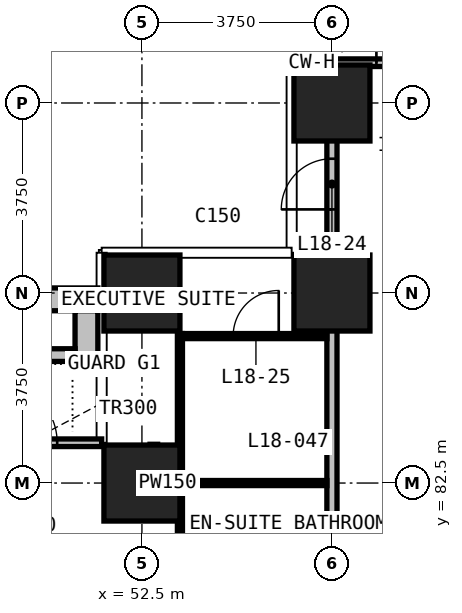
"""IFC4 building model, lengths in metres.
Left out: names, types, materials, properties, quantities, classifications, styles, units other than length and angle.
Written with IfcOpenShell. Run it as: python <this file> out.ifc"""

import sys

from ifc_helpers import new_model, si_unit, direction, frame, frame_2d, origin, origin_2d, place, context, subcontext, project, spatial, rectangle, extrude, element, fill, save


model = new_model("IFC4")
c1 = context("Model", 3, precision=1e-05, world=origin(), true_north=direction((0.0, 1.0)))
c2 = subcontext(c1, "Body", "Model", "MODEL_VIEW")
j1 = project(units=[si_unit("LENGTHUNIT", "METRE"), si_unit("PLANEANGLEUNIT", "RADIAN")], contexts=[c1])
p1 = place(None, origin())
s1 = spatial("IfcSite", under=j1, at=p1, CompositionType="ELEMENT")
p2 = place(p1, origin())
s2 = spatial("IfcBuilding", under=s1, at=p2, CompositionType="ELEMENT")
p3 = place(p2, frame((0.0, 0.0, 79.1)))
s3 = spatial("IfcBuildingStorey", under=s2, at=p3, CompositionType="ELEMENT", Elevation=79.1)
for number, where, z_axis, x_axis in (
    (1, (52.5, 82.5, 0.0), (0.0, 0.0, 1.0), (1.0, 0.0, 0.0)),
    (2, (52.5, 86.25, 0.0), (0.0, 0.0, 1.0), (1.0, 0.0, 0.0)),
    (3, (56.25, 86.25, 0.0), (0.0, 0.0, 1.0), (1.0, 0.0, 0.0)),
    (4, (56.25, 90.0, 0.0), (0.0, 0.0, 1.0), (1.0, 0.0, 0.0)),
):
    element("IfcColumn", number, at=place(p3, frame(where, z_axis=z_axis, x_axis=x_axis)), inside=s3, PredefinedType="COLUMN", context=c2, shape_type="SweptSolid", body=[
        extrude(rectangle(XDim=1.5, YDim=1.5, at=origin_2d()), origin(), (0.0, 0.0, 1.0), 3.3),
    ])
p4 = place(p3, frame((56.25, 90.795, 0.0), z_axis=(0.0, 0.0, 1.0), x_axis=(1.0, 0.0, 0.0)))
e5 = element("IfcWall", 5, at=p4, inside=s3, PredefinedType="SOLIDWALL", context=c2, shape_type="SweptSolid", body=[
    extrude(rectangle(XDim=2.955, YDim=0.15, at=frame_2d((1.478, 0.0))), origin(), (0.0, 0.0, 1.0), 3.0),
])
p5 = place(p4, frame((0.877, 0.0, 0.0)))
e6 = element("IfcOpeningElement", 6, at=p5, cuts=e5, PredefinedType="OPENING", context=c2, shape_type="SweptSolid", body=[
    extrude(rectangle(XDim=1.2, YDim=2.4, at=frame_2d((0.6, 1.2))), frame((0.0, 0.085, 0.0), z_axis=(0.0, -1.0, 0.0), x_axis=(1.0, 0.0, 0.0)), (0.0, 0.0, 1.0), 0.17),
])
p6 = place(p3, frame((48.75, 83.295, 0.0), z_axis=(0.0, 0.0, 1.0), x_axis=(1.0, 0.0, 0.0)))
e7 = element("IfcWall", 7, at=p6, inside=s3, PredefinedType="SOLIDWALL", context=c2, shape_type="SweptSolid", body=[
    extrude(rectangle(XDim=2.955, YDim=0.15, at=frame_2d((1.478, 0.0))), origin(), (0.0, 0.0, 1.0), 3.0),
])
p7 = place(p6, frame((0.877, 0.0, 0.0)))
e8 = element("IfcOpeningElement", 8, at=p7, cuts=e7, PredefinedType="OPENING", context=c2, shape_type="SweptSolid", body=[
    extrude(rectangle(XDim=1.2, YDim=2.0, at=frame_2d((0.6, 1.0))), frame((0.0, 0.085, 0.0), z_axis=(0.0, -1.0, 0.0), x_axis=(1.0, 0.0, 0.0)), (0.0, 0.0, 1.0), 0.17),
])
p8 = place(p3, frame((48.45, 86.125, 0.0), z_axis=(0.0, 0.0, 1.0), x_axis=(1.0, 0.0, 0.0)))
e9 = element("IfcWall", 9, at=p8, inside=s3, PredefinedType="USERDEFINED", context=c2, shape_type="SweptSolid", body=[
    extrude(rectangle(XDim=3.18, YDim=0.45, at=frame_2d((1.59, 0.0))), origin(), (0.0, 0.0, 1.0), 1.1),
])
p9 = place(p3, frame((51.405, 84.9, 0.0), z_axis=(0.0, 0.0, 1.0), x_axis=(0.0, 1.0, 0.0)))
e10 = element("IfcWall", 10, at=p9, inside=s3, PredefinedType="USERDEFINED", context=c2, shape_type="SweptSolid", body=[
    extrude(rectangle(XDim=1.0, YDim=0.45, at=frame_2d((0.5, 0.0))), origin(), (0.0, 0.0, 1.0), 1.1),
])
p10 = place(p3, frame((48.9, 85.025, 0.0), z_axis=(0.0, 0.0, 1.0), x_axis=(1.0, 0.0, 0.0)))
e11 = element("IfcWall", 11, at=p10, inside=s3, PredefinedType="USERDEFINED", context=c2, shape_type="SweptSolid", body=[
    extrude(rectangle(XDim=2.28, YDim=0.25, at=frame_2d((1.14, 0.0))), origin(), (0.0, 0.0, 1.0), 1.0),
])
p11 = place(p3, frame((56.25, 52.4, 0.0), z_axis=(0.0, 0.0, 1.0), x_axis=(0.0, 1.0, 0.0)))
e12 = element("IfcWall", 12, at=p11, inside=s3, PredefinedType="PARTITIONING", context=c2, shape_type="SweptSolid", body=[
    extrude(rectangle(XDim=37.675, YDim=0.2, at=frame_2d((18.837, 0.0))), origin(), (0.0, 0.0, 1.0), 3.0),
])
p12 = place(p11, frame((5.5, 0.0, 0.0)))
e13 = element("IfcOpeningElement", 13, at=p12, cuts=e12, PredefinedType="OPENING", context=c2, shape_type="SweptSolid", body=[
    extrude(rectangle(XDim=1.0, YDim=2.2, at=frame_2d((0.5, 1.1))), frame((0.0, 0.11, 0.0), z_axis=(0.0, -1.0, 0.0), x_axis=(1.0, 0.0, 0.0)), (0.0, 0.0, 1.0), 0.22),
])
p13 = place(p11, frame((8.7, 0.0, 0.0)))
e14 = element("IfcOpeningElement", 14, at=p13, cuts=e12, PredefinedType="OPENING", context=c2, shape_type="SweptSolid", body=[
    extrude(rectangle(XDim=1.0, YDim=2.2, at=frame_2d((0.5, 1.1))), frame((0.0, 0.11, 0.0), z_axis=(0.0, -1.0, 0.0), x_axis=(1.0, 0.0, 0.0)), (0.0, 0.0, 1.0), 0.22),
])
p14 = place(p11, frame((20.5, 0.0, 0.0)))
e15 = element("IfcOpeningElement", 15, at=p14, cuts=e12, PredefinedType="OPENING", context=c2, shape_type="SweptSolid", body=[
    extrude(rectangle(XDim=1.0, YDim=2.2, at=frame_2d((0.5, 1.1))), frame((0.0, 0.11, 0.0), z_axis=(0.0, -1.0, 0.0), x_axis=(1.0, 0.0, 0.0)), (0.0, 0.0, 1.0), 0.22),
])
p15 = place(p11, frame((23.7, 0.0, 0.0)))
e16 = element("IfcOpeningElement", 16, at=p15, cuts=e12, PredefinedType="OPENING", context=c2, shape_type="SweptSolid", body=[
    extrude(rectangle(XDim=1.0, YDim=2.2, at=frame_2d((0.5, 1.1))), frame((0.0, 0.11, 0.0), z_axis=(0.0, -1.0, 0.0), x_axis=(1.0, 0.0, 0.0)), (0.0, 0.0, 1.0), 0.22),
])
p16 = place(p11, frame((35.5, 0.0, 0.0)))
e17 = element("IfcOpeningElement", 17, at=p16, cuts=e12, PredefinedType="OPENING", context=c2, shape_type="SweptSolid", body=[
    extrude(rectangle(XDim=1.0, YDim=2.2, at=frame_2d((0.5, 1.1))), frame((0.0, 0.11, 0.0), z_axis=(0.0, -1.0, 0.0), x_axis=(1.0, 0.0, 0.0)), (0.0, 0.0, 1.0), 0.22),
])
p17 = place(p3, frame((56.25, 90.03, 0.0), z_axis=(0.0, 0.0, 1.0), x_axis=(0.0, 1.0, 0.0)))
e18 = element("IfcWall", 18, at=p17, inside=s3, PredefinedType="PARTITIONING", context=c2, shape_type="SweptSolid", body=[
    extrude(rectangle(XDim=0.615, YDim=0.2, at=frame_2d((0.308, 0.0))), origin(), (0.0, 0.0, 1.0), 3.0),
])
p18 = place(p3, frame((52.81, 82.5, 0.0), z_axis=(0.0, 0.0, 1.0), x_axis=(1.0, 0.0, 0.0)))
e19 = element("IfcWall", 19, at=p18, inside=s3, PredefinedType="PARTITIONING", context=c2, shape_type="SweptSolid", body=[
    extrude(rectangle(XDim=0.39, YDim=0.15, at=frame_2d((0.195, 0.0))), origin(), (0.0, 0.0, 1.0), 3.0),
])
p19 = place(p3, frame((55.605, 90.0, 0.0), z_axis=(0.0, 0.0, 1.0), x_axis=(1.0, 0.0, 0.0)))
e20 = element("IfcWall", 20, at=p19, inside=s3, PredefinedType="PARTITIONING", context=c2, shape_type="SweptSolid", body=[
    extrude(rectangle(XDim=0.545, YDim=0.15, at=frame_2d((0.272, 0.0))), origin(), (0.0, 0.0, 1.0), 3.0),
])
p20 = place(p3, frame((52.735, 82.425, 0.0), z_axis=(0.0, 0.0, 1.0), x_axis=(0.0, 1.0, 0.0)))
e21 = element("IfcWall", 21, at=p20, inside=s3, PredefinedType="PARTITIONING", context=c2, shape_type="SweptSolid", body=[
    extrude(rectangle(XDim=0.84, YDim=0.15, at=frame_2d((0.42, 0.0))), origin(), (0.0, 0.0, 1.0), 3.0),
])
p21 = place(p3, frame((53.3, 82.5, 0.0), z_axis=(0.0, 0.0, 1.0), x_axis=(1.0, 0.0, 0.0)))
e22 = element("IfcWall", 22, at=p21, inside=s3, PredefinedType="PARTITIONING", context=c2, shape_type="SweptSolid", body=[
    extrude(rectangle(XDim=2.85, YDim=0.1, at=frame_2d((1.425, 0.0))), origin(), (0.0, 0.0, 1.0), 3.0),
])
p22 = place(p3, frame((53.3, 85.4, 0.0), z_axis=(0.0, 0.0, 1.0), x_axis=(1.0, 0.0, 0.0)))
e23 = element("IfcWall", 23, at=p22, inside=s3, PredefinedType="PARTITIONING", context=c2, shape_type="SweptSolid", body=[
    extrude(rectangle(XDim=2.85, YDim=0.1, at=frame_2d((1.425, 0.0))), origin(), (0.0, 0.0, 1.0), 3.0),
])
p23 = place(p22, frame((1.0, 0.0, 0.0)))
e24 = element("IfcOpeningElement", 24, at=p23, cuts=e23, PredefinedType="OPENING", context=c2, shape_type="SweptSolid", body=[
    extrude(rectangle(XDim=0.9, YDim=2.2, at=frame_2d((0.45, 1.1))), frame((0.0, 0.06, 0.0), z_axis=(0.0, -1.0, 0.0), x_axis=(1.0, 0.0, 0.0)), (0.0, 0.0, 1.0), 0.12),
])
p24 = place(p3, frame((53.25, 79.55, 0.0), z_axis=(0.0, 0.0, 1.0), x_axis=(0.0, 1.0, 0.0)))
e25 = element("IfcWall", 25, at=p24, inside=s3, PredefinedType="PARTITIONING", context=c2, shape_type="SweptSolid", body=[
    extrude(rectangle(XDim=5.9, YDim=0.1, at=frame_2d((2.95, 0.0))), origin(), (0.0, 0.0, 1.0), 3.0),
])
p25 = place(p5, origin())
e26 = element("IfcDoor", 26, at=p25, inside=s3, OperationType="SINGLE_SWING_LEFT", PredefinedType="DOOR", context=c2, shape_type="SweptSolid", body=[
    extrude(rectangle(XDim=1.2, YDim=2.4, at=frame_2d((0.6, 1.2))), frame((0.0, 0.025, 0.0), z_axis=(0.0, -1.0, 0.0), x_axis=(1.0, 0.0, 0.0)), (0.0, 0.0, 1.0), 0.05),
])
fill(e6, e26)
p26 = place(p7, origin())
e27 = element("IfcDoor", 27, at=p26, inside=s3, OperationType="SINGLE_SWING_LEFT", PredefinedType="DOOR", context=c2, shape_type="SweptSolid", body=[
    extrude(rectangle(XDim=1.2, YDim=2.0, at=frame_2d((0.6, 1.0))), frame((0.0, 0.025, 0.0), z_axis=(0.0, -1.0, 0.0), x_axis=(1.0, 0.0, 0.0)), (0.0, 0.0, 1.0), 0.05),
])
fill(e8, e27)
p27 = place(p16, origin())
e28 = element("IfcDoor", 28, at=p27, inside=s3, OperationType="SINGLE_SWING_LEFT", PredefinedType="DOOR", context=c2, shape_type="SweptSolid", body=[
    extrude(rectangle(XDim=1.0, YDim=2.2, at=frame_2d((0.5, 1.1))), frame((0.0, 0.025, 0.0), z_axis=(0.0, -1.0, 0.0), x_axis=(1.0, 0.0, 0.0)), (0.0, 0.0, 1.0), 0.05),
])
fill(e17, e28)
p28 = place(p23, origin())
e29 = element("IfcDoor", 29, at=p28, inside=s3, OperationType="SINGLE_SWING_RIGHT", PredefinedType="DOOR", context=c2, shape_type="SweptSolid", body=[
    extrude(rectangle(XDim=0.9, YDim=2.2, at=frame_2d((0.45, 1.1))), frame((0.0, 0.025, 0.0), z_axis=(0.0, -1.0, 0.0), x_axis=(1.0, 0.0, 0.0)), (0.0, 0.0, 1.0), 0.05),
])
fill(e24, e29)
save(model, sys.argv[1])
